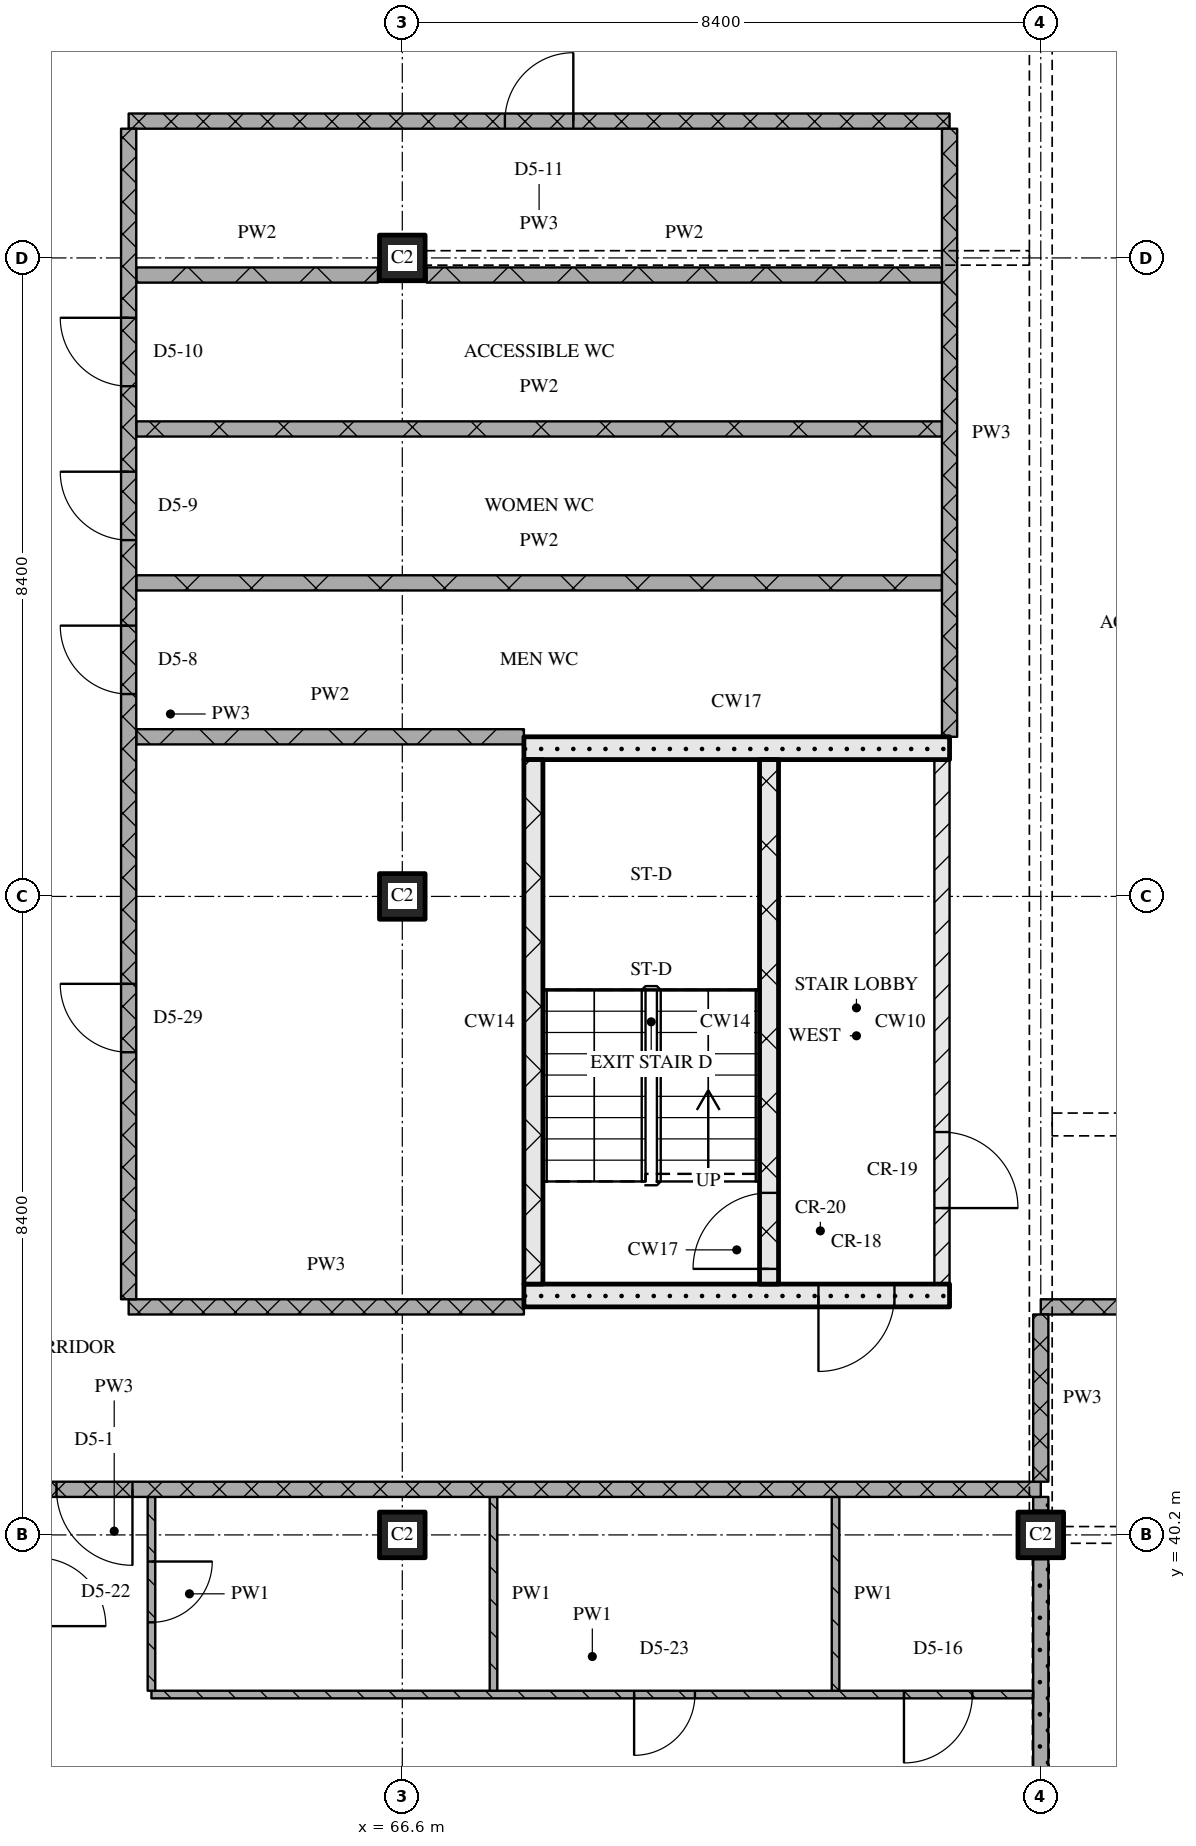
"""IFC4 building model, lengths in metres.
Left out: names, types, materials, properties, quantities, classifications, styles, units other than length and angle.
Written with IfcOpenShell. Run it as: python <this file> out.ifc"""

import sys

from ifc_helpers import new_model, si_unit, direction, frame, frame_2d, origin, origin_2d, place, context, subcontext, project, spatial, rectangle, extrude, element, fill, save


model = new_model("IFC4")
c1 = context("Model", 3, precision=1e-05, world=origin(), true_north=direction((0.0, 1.0)))
c2 = subcontext(c1, "Body", "Model", "MODEL_VIEW")
j1 = project(units=[si_unit("LENGTHUNIT", "METRE"), si_unit("PLANEANGLEUNIT", "RADIAN")], contexts=[c1])
p1 = place(None, origin())
s1 = spatial("IfcSite", under=j1, at=p1, CompositionType="ELEMENT")
p2 = place(p1, origin())
s2 = spatial("IfcBuilding", under=s1, at=p2, CompositionType="ELEMENT")
p3 = place(p2, frame((0.0, 0.0, 248.7)))
s3 = spatial("IfcBuildingStorey", under=s2, at=p3, CompositionType="ELEMENT", Elevation=248.7)
for number, where, z_axis, x_axis in (
    (1, (66.6, 40.2, 0.0), (0.0, 0.0, 1.0), (1.0, 0.0, 0.0)),
    (2, (66.6, 48.6, 0.0), (0.0, 0.0, 1.0), (1.0, 0.0, 0.0)),
    (3, (66.6, 57.0, 0.0), (0.0, 0.0, 1.0), (1.0, 0.0, 0.0)),
    (4, (75.0, 40.2, 0.0), (0.0, 0.0, 1.0), (1.0, 0.0, 0.0)),
):
    element("IfcColumn", number, at=place(p3, frame(where, z_axis=z_axis, x_axis=x_axis)), inside=s3, PredefinedType="COLUMN", context=c2, shape_type="SweptSolid", body=[
        extrude(rectangle(XDim=0.6, YDim=0.6, at=origin_2d()), origin(), (0.0, 0.0, 1.0), 3.6),
    ])
p4 = place(p3, frame((68.2, 43.35, 0.0), z_axis=(0.0, 0.0, 1.0), x_axis=(1.0, 0.0, 0.0)))
e5 = element("IfcWall", 5, at=p4, inside=s3, PredefinedType="SOLIDWALL", context=c2, shape_type="SweptSolid", body=[
    extrude(rectangle(XDim=5.6, YDim=0.3, at=frame_2d((2.8, 0.0))), origin(), (0.0, 0.0, 1.0), 3.3),
])
p5 = place(p4, frame((3.875, 0.0, 0.0)))
e6 = element("IfcOpeningElement", 6, at=p5, cuts=e5, PredefinedType="OPENING", context=c2, shape_type="SweptSolid", body=[
    extrude(rectangle(XDim=1.0, YDim=2.1, at=frame_2d((0.5, 1.05))), frame((0.0, 0.16, 0.0), z_axis=(0.0, -1.0, 0.0), x_axis=(1.0, 0.0, 0.0)), (0.0, 0.0, 1.0), 0.32),
])
p6 = place(p3, frame((68.325, 43.5, 0.0), z_axis=(0.0, 0.0, 1.0), x_axis=(0.0, 1.0, 0.0)))
e7 = element("IfcWall", 7, at=p6, inside=s3, PredefinedType="SOLIDWALL", context=c2, shape_type="SweptSolid", body=[
    extrude(rectangle(XDim=6.9, YDim=0.25, at=frame_2d((3.45, 0.0))), origin(), (0.0, 0.0, 1.0), 3.3),
])
p7 = place(p3, frame((71.425, 43.5, 0.0), z_axis=(0.0, 0.0, 1.0), x_axis=(0.0, 1.0, 0.0)))
e8 = element("IfcWall", 8, at=p7, inside=s3, PredefinedType="SOLIDWALL", context=c2, shape_type="SweptSolid", body=[
    extrude(rectangle(XDim=6.9, YDim=0.25, at=frame_2d((3.45, 0.0))), origin(), (0.0, 0.0, 1.0), 3.3),
])
p8 = place(p7, frame((0.2, 0.0, 0.0)))
e9 = element("IfcOpeningElement", 9, at=p8, cuts=e8, PredefinedType="OPENING", context=c2, shape_type="SweptSolid", body=[
    extrude(rectangle(XDim=1.0, YDim=2.1, at=frame_2d((0.5, 1.05))), frame((0.0, 0.135, 0.0), z_axis=(0.0, -1.0, 0.0), x_axis=(1.0, 0.0, 0.0)), (0.0, 0.0, 1.0), 0.27),
])
p9 = place(p3, frame((73.7, 43.5, 0.0), z_axis=(0.0, 0.0, 1.0), x_axis=(0.0, 1.0, 0.0)))
e10 = element("IfcWall", 10, at=p9, inside=s3, PredefinedType="PARTITIONING", context=c2, shape_type="SweptSolid", body=[
    extrude(rectangle(XDim=6.9, YDim=0.2, at=frame_2d((3.45, 0.0))), origin(), (0.0, 0.0, 1.0), 3.3),
])
p10 = place(p9, frame((1.0, 0.0, 0.0)))
e11 = element("IfcOpeningElement", 11, at=p10, cuts=e10, PredefinedType="OPENING", context=c2, shape_type="SweptSolid", body=[
    extrude(rectangle(XDim=1.0, YDim=2.1, at=frame_2d((0.5, 1.05))), frame((0.0, 0.11, 0.0), z_axis=(0.0, -1.0, 0.0), x_axis=(1.0, 0.0, 0.0)), (0.0, 0.0, 1.0), 0.22),
])
p11 = place(p3, frame((68.2, 50.55, 0.0), z_axis=(0.0, 0.0, 1.0), x_axis=(1.0, 0.0, 0.0)))
e12 = element("IfcWall", 12, at=p11, inside=s3, PredefinedType="SOLIDWALL", context=c2, shape_type="SweptSolid", body=[
    extrude(rectangle(XDim=5.6, YDim=0.3, at=frame_2d((2.8, 0.0))), origin(), (0.0, 0.0, 1.0), 3.3),
])
p12 = place(p3, frame((63.3, 38.1, 0.0), z_axis=(0.0, 0.0, 1.0), x_axis=(1.0, 0.0, 0.0)))
e13 = element("IfcWall", 13, at=p12, inside=s3, PredefinedType="PARTITIONING", context=c2, shape_type="SweptSolid", body=[
    extrude(rectangle(XDim=11.6, YDim=0.1, at=frame_2d((5.8, 0.0))), origin(), (0.0, 0.0, 1.0), 3.3),
])
p13 = place(p12, frame((6.35, 0.0, 0.0)))
e14 = element("IfcOpeningElement", 14, at=p13, cuts=e13, PredefinedType="OPENING", context=c2, shape_type="SweptSolid", body=[
    extrude(rectangle(XDim=0.8, YDim=2.1, at=frame_2d((0.4, 1.05))), frame((0.0, 0.06, 0.0), z_axis=(0.0, -1.0, 0.0), x_axis=(1.0, 0.0, 0.0)), (0.0, 0.0, 1.0), 0.12),
])
p14 = place(p12, frame((9.9, 0.0, 0.0)))
e15 = element("IfcOpeningElement", 15, at=p14, cuts=e13, PredefinedType="OPENING", context=c2, shape_type="SweptSolid", body=[
    extrude(rectangle(XDim=0.9, YDim=2.1, at=frame_2d((0.45, 1.05))), frame((0.0, 0.06, 0.0), z_axis=(0.0, -1.0, 0.0), x_axis=(1.0, 0.0, 0.0)), (0.0, 0.0, 1.0), 0.12),
])
p15 = place(p3, frame((75.0, 40.8, 0.0), z_axis=(0.0, 0.0, 1.0), x_axis=(-1.0, 0.0, 0.0)))
e16 = element("IfcWall", 16, at=p15, inside=s3, PredefinedType="PARTITIONING", context=c2, shape_type="SweptSolid", body=[
    extrude(rectangle(XDim=24.38, YDim=0.2, at=frame_2d((12.19, 0.0))), origin(), (0.0, 0.0, 1.0), 3.3),
])
p16 = place(p15, frame((11.95, 0.0, 0.0)))
e17 = element("IfcOpeningElement", 17, at=p16, cuts=e16, PredefinedType="OPENING", context=c2, shape_type="SweptSolid", body=[
    extrude(rectangle(XDim=1.0, YDim=2.1, at=frame_2d((0.5, 1.05))), frame((0.0, 0.11, 0.0), z_axis=(0.0, -1.0, 0.0), x_axis=(1.0, 0.0, 0.0)), (0.0, 0.0, 1.0), 0.22),
])
p17 = place(p3, frame((63.0, 43.2, 0.0), z_axis=(0.0, 0.0, 1.0), x_axis=(1.0, 0.0, 0.0)))
e18 = element("IfcWall", 18, at=p17, inside=s3, PredefinedType="PARTITIONING", context=c2, shape_type="SweptSolid", body=[
    extrude(rectangle(XDim=5.2, YDim=0.2, at=frame_2d((2.6, 0.0))), origin(), (0.0, 0.0, 1.0), 3.3),
])
p18 = place(p3, frame((100.2, 43.2, 0.0), z_axis=(0.0, 0.0, 1.0), x_axis=(-1.0, 0.0, 0.0)))
e19 = element("IfcWall", 19, at=p18, inside=s3, PredefinedType="PARTITIONING", context=c2, shape_type="SweptSolid", body=[
    extrude(rectangle(XDim=25.2, YDim=0.2, at=frame_2d((12.6, 0.0))), origin(), (0.0, 0.0, 1.0), 3.3),
])
p19 = place(p18, frame((3.6, 0.0, 0.0)))
e20 = element("IfcOpeningElement", 20, at=p19, cuts=e19, PredefinedType="OPENING", context=c2, shape_type="SweptSolid", body=[
    extrude(rectangle(XDim=1.2, YDim=2.1, at=frame_2d((0.6, 1.05))), frame((0.0, 0.11, 0.0), z_axis=(0.0, -1.0, 0.0), x_axis=(1.0, 0.0, 0.0)), (0.0, 0.0, 1.0), 0.22),
])
p20 = place(p18, frame((16.2, 0.0, 0.0)))
e21 = element("IfcOpeningElement", 21, at=p20, cuts=e19, PredefinedType="OPENING", context=c2, shape_type="SweptSolid", body=[
    extrude(rectangle(XDim=1.2, YDim=2.1, at=frame_2d((0.6, 1.05))), frame((0.0, 0.11, 0.0), z_axis=(0.0, -1.0, 0.0), x_axis=(1.0, 0.0, 0.0)), (0.0, 0.0, 1.0), 0.22),
])
p21 = place(p3, frame((63.1, 50.7, 0.0), z_axis=(0.0, 0.0, 1.0), x_axis=(1.0, 0.0, 0.0)))
e22 = element("IfcWall", 22, at=p21, inside=s3, PredefinedType="PARTITIONING", context=c2, shape_type="SweptSolid", body=[
    extrude(rectangle(XDim=5.1, YDim=0.2, at=frame_2d((2.55, 0.0))), origin(), (0.0, 0.0, 1.0), 3.3),
])
for number, where, z_axis, x_axis in (
    (23, (63.1, 52.725, 0.0), (0.0, 0.0, 1.0), (1.0, 0.0, 0.0)),
    (24, (63.1, 54.75, 0.0), (0.0, 0.0, 1.0), (1.0, 0.0, 0.0)),
):
    element("IfcWall", number, at=place(p3, frame(where, z_axis=z_axis, x_axis=x_axis)), inside=s3, PredefinedType="PARTITIONING", context=c2, shape_type="SweptSolid", body=[
        extrude(rectangle(XDim=10.6, YDim=0.2, at=frame_2d((5.3, 0.0))), origin(), (0.0, 0.0, 1.0), 3.3),
    ])
p22 = place(p3, frame((63.1, 56.775, 0.0), z_axis=(0.0, 0.0, 1.0), x_axis=(1.0, 0.0, 0.0)))
e25 = element("IfcWall", 25, at=p22, inside=s3, PredefinedType="PARTITIONING", context=c2, shape_type="SweptSolid", body=[
    extrude(rectangle(XDim=3.18, YDim=0.2, at=frame_2d((1.59, 0.0))), origin(), (0.0, 0.0, 1.0), 3.3),
])
p23 = place(p3, frame((66.92, 56.775, 0.0), z_axis=(0.0, 0.0, 1.0), x_axis=(1.0, 0.0, 0.0)))
e26 = element("IfcWall", 26, at=p23, inside=s3, PredefinedType="PARTITIONING", context=c2, shape_type="SweptSolid", body=[
    extrude(rectangle(XDim=6.78, YDim=0.2, at=frame_2d((3.39, 0.0))), origin(), (0.0, 0.0, 1.0), 3.3),
])
p24 = place(p3, frame((73.8, 58.8, 0.0), z_axis=(0.0, 0.0, 1.0), x_axis=(-1.0, 0.0, 0.0)))
e27 = element("IfcWall", 27, at=p24, inside=s3, PredefinedType="PARTITIONING", context=c2, shape_type="SweptSolid", body=[
    extrude(rectangle(XDim=10.8, YDim=0.2, at=frame_2d((5.4, 0.0))), origin(), (0.0, 0.0, 1.0), 3.3),
])
p25 = place(p24, frame((4.95, 0.0, 0.0)))
e28 = element("IfcOpeningElement", 28, at=p25, cuts=e27, PredefinedType="OPENING", context=c2, shape_type="SweptSolid", body=[
    extrude(rectangle(XDim=0.9, YDim=2.1, at=frame_2d((0.45, 1.05))), frame((0.0, 0.11, 0.0), z_axis=(0.0, -1.0, 0.0), x_axis=(1.0, 0.0, 0.0)), (0.0, 0.0, 1.0), 0.22),
])
p26 = place(p3, frame((63.0, 58.7, 0.0), z_axis=(0.0, 0.0, 1.0), x_axis=(0.0, -1.0, 0.0)))
e29 = element("IfcWall", 29, at=p26, inside=s3, PredefinedType="PARTITIONING", context=c2, shape_type="SweptSolid", body=[
    extrude(rectangle(XDim=15.4, YDim=0.2, at=frame_2d((7.7, 0.0))), origin(), (0.0, 0.0, 1.0), 3.3),
])
p27 = place(p26, frame((2.488, 0.0, 0.0)))
e30 = element("IfcOpeningElement", 30, at=p27, cuts=e29, PredefinedType="OPENING", context=c2, shape_type="SweptSolid", body=[
    extrude(rectangle(XDim=0.9, YDim=2.1, at=frame_2d((0.45, 1.05))), frame((0.0, 0.11, 0.0), z_axis=(0.0, -1.0, 0.0), x_axis=(1.0, 0.0, 0.0)), (0.0, 0.0, 1.0), 0.22),
])
p28 = place(p26, frame((4.512, 0.0, 0.0)))
e31 = element("IfcOpeningElement", 31, at=p28, cuts=e29, PredefinedType="OPENING", context=c2, shape_type="SweptSolid", body=[
    extrude(rectangle(XDim=0.9, YDim=2.1, at=frame_2d((0.45, 1.05))), frame((0.0, 0.11, 0.0), z_axis=(0.0, -1.0, 0.0), x_axis=(1.0, 0.0, 0.0)), (0.0, 0.0, 1.0), 0.22),
])
p29 = place(p26, frame((6.538, 0.0, 0.0)))
e32 = element("IfcOpeningElement", 32, at=p29, cuts=e29, PredefinedType="OPENING", context=c2, shape_type="SweptSolid", body=[
    extrude(rectangle(XDim=0.9, YDim=2.1, at=frame_2d((0.45, 1.05))), frame((0.0, 0.11, 0.0), z_axis=(0.0, -1.0, 0.0), x_axis=(1.0, 0.0, 0.0)), (0.0, 0.0, 1.0), 0.22),
])
p30 = place(p26, frame((11.25, 0.0, 0.0)))
e33 = element("IfcOpeningElement", 33, at=p30, cuts=e29, PredefinedType="OPENING", context=c2, shape_type="SweptSolid", body=[
    extrude(rectangle(XDim=0.9, YDim=2.1, at=frame_2d((0.45, 1.05))), frame((0.0, 0.11, 0.0), z_axis=(0.0, -1.0, 0.0), x_axis=(1.0, 0.0, 0.0)), (0.0, 0.0, 1.0), 0.22),
])
p31 = place(p3, frame((63.3, 40.7, 0.0), z_axis=(0.0, 0.0, 1.0), x_axis=(0.0, -1.0, 0.0)))
e34 = element("IfcWall", 34, at=p31, inside=s3, PredefinedType="PARTITIONING", context=c2, shape_type="SweptSolid", body=[
    extrude(rectangle(XDim=2.55, YDim=0.1, at=frame_2d((1.275, 0.0))), origin(), (0.0, 0.0, 1.0), 3.3),
])
p32 = place(p31, frame((0.85, 0.0, 0.0)))
e35 = element("IfcOpeningElement", 35, at=p32, cuts=e34, PredefinedType="OPENING", context=c2, shape_type="SweptSolid", body=[
    extrude(rectangle(XDim=0.8, YDim=2.1, at=frame_2d((0.4, 1.05))), frame((0.0, 0.06, 0.0), z_axis=(0.0, -1.0, 0.0), x_axis=(1.0, 0.0, 0.0)), (0.0, 0.0, 1.0), 0.12),
])
for number, where, z_axis, x_axis in (
    (36, (67.8, 40.7, 0.0), (0.0, 0.0, 1.0), (0.0, -1.0, 0.0)),
    (37, (72.3, 40.7, 0.0), (0.0, 0.0, 1.0), (0.0, -1.0, 0.0)),
):
    element("IfcWall", number, at=place(p3, frame(where, z_axis=z_axis, x_axis=x_axis)), inside=s3, PredefinedType="PARTITIONING", context=c2, shape_type="SweptSolid", body=[
        extrude(rectangle(XDim=2.55, YDim=0.1, at=frame_2d((1.275, 0.0))), origin(), (0.0, 0.0, 1.0), 3.3),
    ])
p33 = place(p3, frame((73.8, 58.7, 0.0), z_axis=(0.0, 0.0, 1.0), x_axis=(0.0, -1.0, 0.0)))
e38 = element("IfcWall", 38, at=p33, inside=s3, PredefinedType="PARTITIONING", context=c2, shape_type="SweptSolid", body=[
    extrude(rectangle(XDim=8.0, YDim=0.2, at=frame_2d((4.0, 0.0))), origin(), (0.0, 0.0, 1.0), 3.3),
])
p34 = place(p3, frame((75.0, 43.1, 0.0), z_axis=(0.0, 0.0, 1.0), x_axis=(0.0, -1.0, 0.0)))
e39 = element("IfcWall", 39, at=p34, inside=s3, PredefinedType="PARTITIONING", context=c2, shape_type="SweptSolid", body=[
    extrude(rectangle(XDim=2.2, YDim=0.2, at=frame_2d((1.1, 0.0))), origin(), (0.0, 0.0, 1.0), 2.51),
])
p35 = place(p3, frame((75.0, 39.88, 0.0), z_axis=(0.0, 0.0, 1.0), x_axis=(0.0, -1.0, 0.0)))
e40 = element("IfcWall", 40, at=p35, inside=s3, PredefinedType="PARTITIONING", context=c2, shape_type="SweptSolid", body=[
    extrude(rectangle(XDim=7.76, YDim=0.2, at=frame_2d((3.88, 0.0))), origin(), (0.0, 0.0, 1.0), 2.7),
])
p36 = place(p3, frame((75.0, 40.7, 0.0), z_axis=(0.0, 0.0, 1.0), x_axis=(0.0, -1.0, 0.0)))
e41 = element("IfcWall", 41, at=p36, inside=s3, PredefinedType="PARTITIONING", context=c2, shape_type="SweptSolid", body=[
    extrude(rectangle(XDim=0.18, YDim=0.2, at=frame_2d((0.09, 0.0))), origin(), (0.0, 0.0, 1.0), 3.3),
])
p37 = place(p5, origin())
e42 = element("IfcDoor", 42, at=p37, inside=s3, OperationType="SINGLE_SWING_RIGHT", PredefinedType="DOOR", context=c2, shape_type="SweptSolid", body=[
    extrude(rectangle(XDim=1.0, YDim=2.1, at=frame_2d((0.5, 1.05))), frame((0.0, 0.025, 0.0), z_axis=(0.0, -1.0, 0.0), x_axis=(1.0, 0.0, 0.0)), (0.0, 0.0, 1.0), 0.05),
])
fill(e6, e42)
p38 = place(p8, origin())
e43 = element("IfcDoor", 43, at=p38, inside=s3, OperationType="SINGLE_SWING_LEFT", PredefinedType="DOOR", context=c2, shape_type="SweptSolid", body=[
    extrude(rectangle(XDim=1.0, YDim=2.1, at=frame_2d((0.5, 1.05))), frame((0.0, 0.025, 0.0), z_axis=(0.0, -1.0, 0.0), x_axis=(1.0, 0.0, 0.0)), (0.0, 0.0, 1.0), 0.05),
])
fill(e9, e43)
p39 = place(p10, origin())
e44 = element("IfcDoor", 44, at=p39, inside=s3, OperationType="SINGLE_SWING_RIGHT", PredefinedType="DOOR", context=c2, shape_type="SweptSolid", body=[
    extrude(rectangle(XDim=1.0, YDim=2.1, at=frame_2d((0.5, 1.05))), frame((0.0, 0.025, 0.0), z_axis=(0.0, -1.0, 0.0), x_axis=(1.0, 0.0, 0.0)), (0.0, 0.0, 1.0), 0.05),
])
fill(e11, e44)
p40 = place(p13, origin())
e45 = element("IfcDoor", 45, at=p40, inside=s3, OperationType="SINGLE_SWING_RIGHT", PredefinedType="DOOR", context=c2, shape_type="SweptSolid", body=[
    extrude(rectangle(XDim=0.8, YDim=2.1, at=frame_2d((0.4, 1.05))), frame((0.0, 0.025, 0.0), z_axis=(0.0, -1.0, 0.0), x_axis=(1.0, 0.0, 0.0)), (0.0, 0.0, 1.0), 0.05),
])
fill(e14, e45)
p41 = place(p14, origin())
e46 = element("IfcDoor", 46, at=p41, inside=s3, OperationType="SINGLE_SWING_RIGHT", PredefinedType="DOOR", context=c2, shape_type="SweptSolid", body=[
    extrude(rectangle(XDim=0.9, YDim=2.1, at=frame_2d((0.45, 1.05))), frame((0.0, 0.025, 0.0), z_axis=(0.0, -1.0, 0.0), x_axis=(1.0, 0.0, 0.0)), (0.0, 0.0, 1.0), 0.05),
])
fill(e15, e46)
p42 = place(p16, origin())
e47 = element("IfcDoor", 47, at=p42, inside=s3, OperationType="SINGLE_SWING_LEFT", PredefinedType="DOOR", context=c2, shape_type="SweptSolid", body=[
    extrude(rectangle(XDim=1.0, YDim=2.1, at=frame_2d((0.5, 1.05))), frame((0.0, 0.025, 0.0), z_axis=(0.0, -1.0, 0.0), x_axis=(1.0, 0.0, 0.0)), (0.0, 0.0, 1.0), 0.05),
])
fill(e17, e47)
p43 = place(p25, origin())
e48 = element("IfcDoor", 48, at=p43, inside=s3, OperationType="SINGLE_SWING_RIGHT", PredefinedType="DOOR", context=c2, shape_type="SweptSolid", body=[
    extrude(rectangle(XDim=0.9, YDim=2.1, at=frame_2d((0.45, 1.05))), frame((0.0, 0.025, 0.0), z_axis=(0.0, -1.0, 0.0), x_axis=(1.0, 0.0, 0.0)), (0.0, 0.0, 1.0), 0.05),
])
fill(e28, e48)
p44 = place(p27, origin())
e49 = element("IfcDoor", 49, at=p44, inside=s3, OperationType="SINGLE_SWING_RIGHT", PredefinedType="DOOR", context=c2, shape_type="SweptSolid", body=[
    extrude(rectangle(XDim=0.9, YDim=2.1, at=frame_2d((0.45, 1.05))), frame((0.0, 0.025, 0.0), z_axis=(0.0, -1.0, 0.0), x_axis=(1.0, 0.0, 0.0)), (0.0, 0.0, 1.0), 0.05),
])
fill(e30, e49)
p45 = place(p28, origin())
e50 = element("IfcDoor", 50, at=p45, inside=s3, OperationType="SINGLE_SWING_RIGHT", PredefinedType="DOOR", context=c2, shape_type="SweptSolid", body=[
    extrude(rectangle(XDim=0.9, YDim=2.1, at=frame_2d((0.45, 1.05))), frame((0.0, 0.025, 0.0), z_axis=(0.0, -1.0, 0.0), x_axis=(1.0, 0.0, 0.0)), (0.0, 0.0, 1.0), 0.05),
])
fill(e31, e50)
p46 = place(p29, origin())
e51 = element("IfcDoor", 51, at=p46, inside=s3, OperationType="SINGLE_SWING_RIGHT", PredefinedType="DOOR", context=c2, shape_type="SweptSolid", body=[
    extrude(rectangle(XDim=0.9, YDim=2.1, at=frame_2d((0.45, 1.05))), frame((0.0, 0.025, 0.0), z_axis=(0.0, -1.0, 0.0), x_axis=(1.0, 0.0, 0.0)), (0.0, 0.0, 1.0), 0.05),
])
fill(e32, e51)
p47 = place(p30, origin())
e52 = element("IfcDoor", 52, at=p47, inside=s3, OperationType="SINGLE_SWING_RIGHT", PredefinedType="DOOR", context=c2, shape_type="SweptSolid", body=[
    extrude(rectangle(XDim=0.9, YDim=2.1, at=frame_2d((0.45, 1.05))), frame((0.0, 0.025, 0.0), z_axis=(0.0, -1.0, 0.0), x_axis=(1.0, 0.0, 0.0)), (0.0, 0.0, 1.0), 0.05),
])
fill(e33, e52)
p48 = place(p32, origin())
e53 = element("IfcDoor", 53, at=p48, inside=s3, OperationType="SINGLE_SWING_LEFT", PredefinedType="DOOR", context=c2, shape_type="SweptSolid", body=[
    extrude(rectangle(XDim=0.8, YDim=2.1, at=frame_2d((0.4, 1.05))), frame((0.0, 0.025, 0.0), z_axis=(0.0, -1.0, 0.0), x_axis=(1.0, 0.0, 0.0)), (0.0, 0.0, 1.0), 0.05),
])
fill(e35, e53)
save(model, sys.argv[1])
